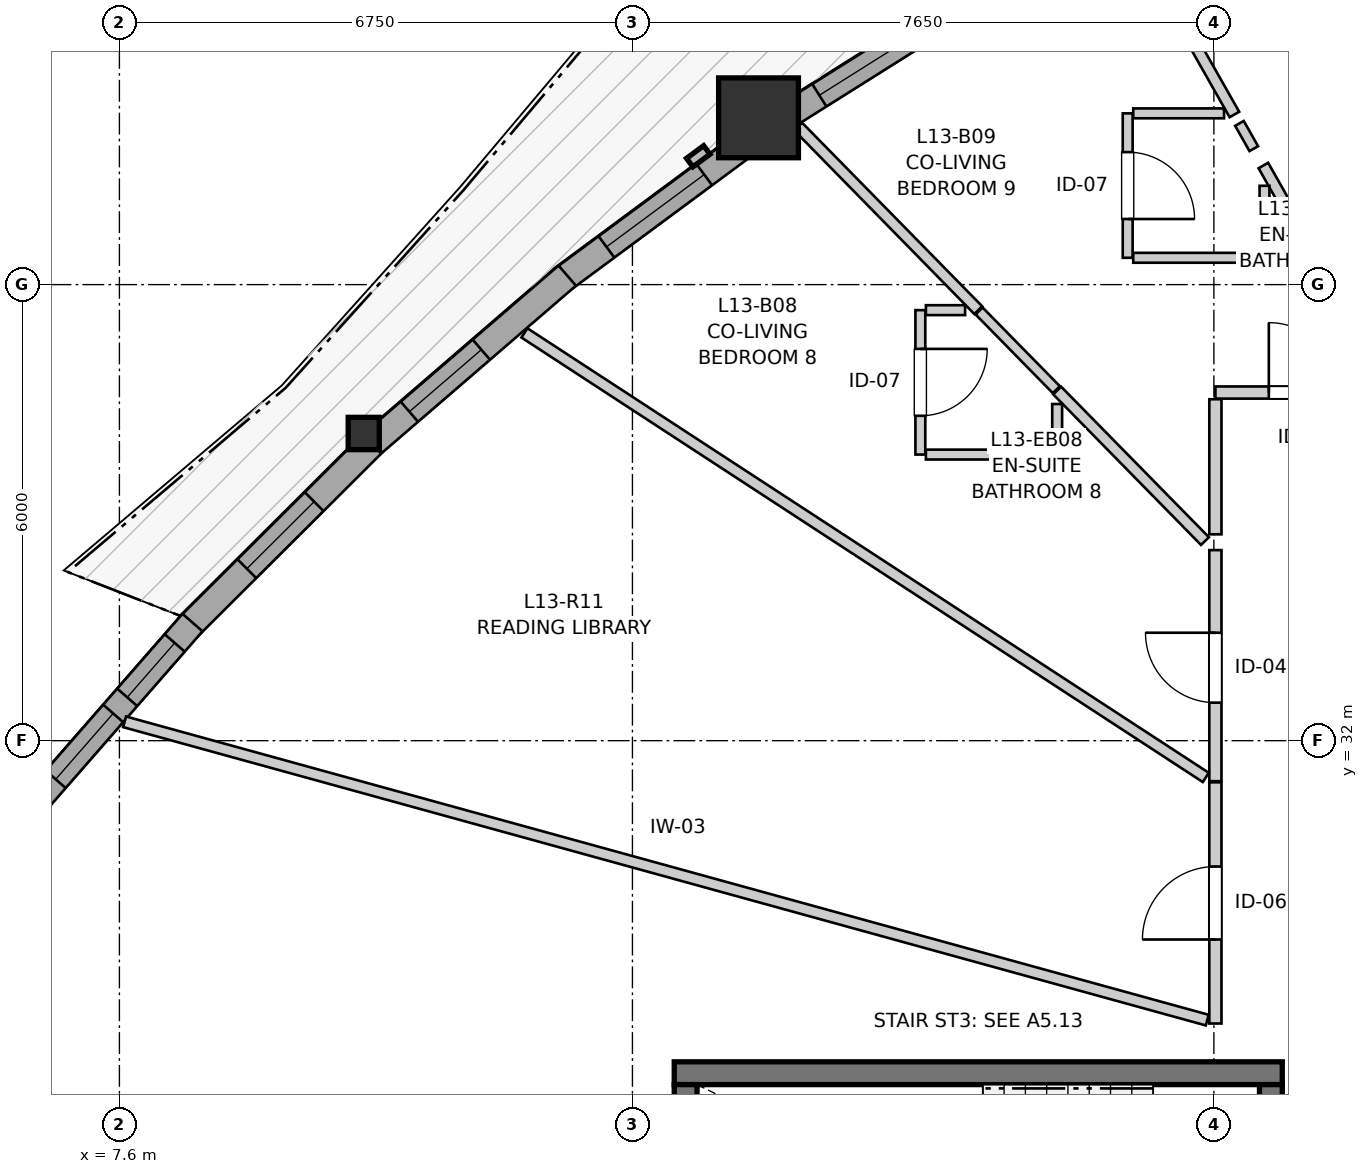
"""IFC4 building model, lengths in metres.
Left out: names, types, materials, properties, quantities, classifications, styles, units other than length and angle.
Written with IfcOpenShell. Run it as: python <this file> out.ifc"""

import sys

from ifc_helpers import new_model, si_unit, direction, frame, frame_2d, origin, origin_2d, place, context, subcontext, project, spatial, rectangle, i_section, extrude, source, transform, mapped, element, fill, save


model = new_model("IFC4")
c1 = context("Model", 3, precision=1e-05, world=origin(), true_north=direction((0.0, 1.0)))
c2 = subcontext(c1, "Body", "Model", "MODEL_VIEW")
j1 = project(units=[si_unit("LENGTHUNIT", "METRE"), si_unit("PLANEANGLEUNIT", "RADIAN")], contexts=[c1])
p1 = place(None, origin())
s1 = spatial("IfcSite", under=j1, at=p1, CompositionType="ELEMENT")
p2 = place(p1, origin())
s2 = spatial("IfcBuilding", under=s1, at=p2, CompositionType="ELEMENT")
p3 = place(p2, frame((0.0, 0.0, 46.2)))
s3 = spatial("IfcBuildingStorey", under=s2, at=p3, CompositionType="ELEMENT", Elevation=46.2)
p4 = place(p3, frame((22.9, 27.625, 0.0), z_axis=(0.0, 0.0, 1.0), x_axis=(-1.0, 0.0, 0.0)))
e1 = element("IfcWall", 1, at=p4, inside=s3, PredefinedType="SHEAR", context=c2, shape_type="SweptSolid", body=[
    extrude(rectangle(XDim=8.0, YDim=0.3, at=frame_2d((4.0, 0.0))), origin(), (0.0, 0.0, 1.0), 2.94),
])
p5 = place(p3, frame((15.05, 27.475, 0.0), z_axis=(0.0, 0.0, 1.0), x_axis=(0.0, -1.0, 0.0)))
e2 = element("IfcWall", 2, at=p5, inside=s3, PredefinedType="SHEAR", context=c2, shape_type="SweptSolid", body=[
    extrude(rectangle(XDim=2.95, YDim=0.3, at=frame_2d((1.475, 0.0))), origin(), (0.0, 0.0, 1.0), 2.94),
])
p6 = place(p3, frame((22.75, 24.525, 0.0), z_axis=(0.0, 0.0, 1.0), x_axis=(0.0, 1.0, 0.0)))
e3 = element("IfcWall", 3, at=p6, inside=s3, PredefinedType="SHEAR", context=c2, shape_type="SweptSolid", body=[
    extrude(rectangle(XDim=2.95, YDim=0.3, at=frame_2d((1.475, 0.0))), origin(), (0.0, 0.0, 1.0), 2.94),
])
p7 = place(p6, frame((0.985, 0.0, 0.0)))
e4 = element("IfcOpeningElement", 4, at=p7, cuts=e3, PredefinedType="OPENING", context=c2, shape_type="SweptSolid", body=[
    extrude(rectangle(XDim=0.98, YDim=2.15, at=frame_2d((0.49, 1.075))), frame((0.0, 0.16, 0.0), z_axis=(0.0, -1.0, 0.0), x_axis=(1.0, 0.0, 0.0)), (0.0, 0.0, 1.0), 0.32),
])
m1 = source(origin(), c2, "Body", "SweptSolid", [
    extrude(rectangle(XDim=1.05, YDim=1.05, at=origin_2d()), origin(), (0.0, 0.0, 1.0), 2.94),
])
p8 = place(p3, frame((16.009, 40.194, 0.0), z_axis=(0.0, 0.0, 1.0), x_axis=(1.0, 0.0, 0.0)))
e5 = element("IfcColumn", 5, at=p8, inside=s3, PredefinedType="COLUMN", context=c2, shape_type="MappedRepresentation", body=[
    mapped(m1, transform((0.0, 0.0, 0.0), x_axis=(1.0, 0.0, 0.0), y_axis=(0.0, 1.0, 0.0), z_axis=(0.0, 0.0, 1.0), scale=1.0)),
])
m2 = source(origin(), c2, "Body", "SweptSolid", [
    extrude(i_section(OverallWidth=0.409, OverallDepth=0.425, WebThickness=0.03, FlangeThickness=0.048, FilletRadius=0.015, at=origin_2d()), origin(), (0.0, 0.0, 1.0), 2.94),
])
p9 = place(p3, frame((10.815, 36.042, 0.0), z_axis=(0.0, 0.0, 1.0), x_axis=(1.0, 0.0, 0.0)))
e6 = element("IfcColumn", 6, at=p9, inside=s3, PredefinedType="PILASTER", context=c2, shape_type="MappedRepresentation", body=[
    mapped(m2, transform((0.0, 0.0, 0.0), x_axis=(1.0, 0.0, 0.0), y_axis=(0.0, 1.0, 0.0), z_axis=(0.0, 0.0, 1.0), scale=1.0)),
])
p10 = place(p3, frame((18.919, 41.818, 0.0), z_axis=(0.0, 0.0, 1.0), x_axis=(-0.846409172462, -0.532533109555, 0.0)))
e7 = element("IfcWall", 7, at=p10, inside=s3, PredefinedType="SOLIDWALL", context=c2, shape_type="SweptSolid", body=[
    extrude(rectangle(XDim=3.028, YDim=0.35, at=frame_2d((1.514, 0.0))), origin(), (0.0, 0.0, 1.0), 2.42),
])
p11 = place(p10, frame((0.543, 0.0, 0.82)))
e8 = element("IfcOpeningElement", 8, at=p11, cuts=e7, PredefinedType="OPENING", context=c2, shape_type="SweptSolid", body=[
    extrude(rectangle(XDim=1.95, YDim=1.4, at=frame_2d((0.975, 0.7))), frame((0.0, 0.185, 0.0), z_axis=(0.0, -1.0, 0.0), x_axis=(1.0, 0.0, 0.0)), (0.0, 0.0, 1.0), 0.37),
])
p12 = place(p3, frame((15.872, 39.875, 0.0), z_axis=(0.0, 0.0, 1.0), x_axis=(-0.803801282622, -0.594897888763, 0.0)))
e9 = element("IfcWall", 9, at=p12, inside=s3, PredefinedType="SOLIDWALL", context=c2, shape_type="SweptSolid", body=[
    extrude(rectangle(XDim=3.047, YDim=0.35, at=frame_2d((1.523, 0.0))), origin(), (0.0, 0.0, 1.0), 2.42),
])
p13 = place(p12, frame((0.719, 0.0, 0.82)))
e10 = element("IfcOpeningElement", 10, at=p13, cuts=e9, PredefinedType="OPENING", context=c2, shape_type="SweptSolid", body=[
    extrude(rectangle(XDim=1.6, YDim=1.35, at=frame_2d((0.8, 0.675))), frame((0.0, 0.185, 0.0), z_axis=(0.0, -1.0, 0.0), x_axis=(1.0, 0.0, 0.0)), (0.0, 0.0, 1.0), 0.37),
])
p14 = place(p3, frame((13.492, 38.118, 0.0), z_axis=(0.0, 0.0, 1.0), x_axis=(-0.7574607021, -0.652880758465, 0.0)))
e11 = element("IfcWall", 11, at=p14, inside=s3, PredefinedType="SOLIDWALL", context=c2, shape_type="SweptSolid", body=[
    extrude(rectangle(XDim=3.364, YDim=0.35, at=frame_2d((1.682, 0.0))), origin(), (0.0, 0.0, 1.0), 2.42),
])
p15 = place(p14, frame((1.492, 0.0, 0.82)))
e12 = element("IfcOpeningElement", 12, at=p15, cuts=e11, PredefinedType="OPENING", context=c2, shape_type="SweptSolid", body=[
    extrude(rectangle(XDim=1.25, YDim=1.35, at=frame_2d((0.625, 0.675))), frame((0.0, 0.185, 0.0), z_axis=(0.0, -1.0, 0.0), x_axis=(1.0, 0.0, 0.0)), (0.0, 0.0, 1.0), 0.37),
])
p16 = place(p3, frame((10.924, 35.903, 0.0), z_axis=(0.0, 0.0, 1.0), x_axis=(-0.708390611179, -0.705820616016, 0.0)))
e13 = element("IfcWall", 13, at=p16, inside=s3, PredefinedType="SOLIDWALL", context=c2, shape_type="SweptSolid", body=[
    extrude(rectangle(XDim=3.42, YDim=0.35, at=frame_2d((1.71, 0.0))), origin(), (0.0, 0.0, 1.0), 2.42),
])
p17 = place(p16, frame((1.075, 0.0, 0.82)))
e14 = element("IfcOpeningElement", 14, at=p17, cuts=e13, PredefinedType="OPENING", context=c2, shape_type="SweptSolid", body=[
    extrude(rectangle(XDim=1.25, YDim=1.35, at=frame_2d((0.625, 0.675))), frame((0.0, 0.185, 0.0), z_axis=(0.0, -1.0, 0.0), x_axis=(1.0, 0.0, 0.0)), (0.0, 0.0, 1.0), 0.37),
])
p18 = place(p3, frame((8.562, 33.554, 0.0), z_axis=(0.0, 0.0, 1.0), x_axis=(-0.657600137419, -0.753367147722, 0.0)))
e15 = element("IfcWall", 15, at=p18, inside=s3, PredefinedType="SOLIDWALL", context=c2, shape_type="SweptSolid", body=[
    extrude(rectangle(XDim=3.212, YDim=0.35, at=frame_2d((1.606, 0.0))), origin(), (0.0, 0.0, 1.0), 2.42),
])
p19 = place(p18, frame((0.356, 0.0, 0.82)))
e16 = element("IfcOpeningElement", 16, at=p19, cuts=e15, PredefinedType="OPENING", context=c2, shape_type="SweptSolid", body=[
    extrude(rectangle(XDim=0.95, YDim=1.35, at=frame_2d((0.475, 0.675))), frame((0.0, 0.185, 0.0), z_axis=(0.0, -1.0, 0.0), x_axis=(1.0, 0.0, 0.0)), (0.0, 0.0, 1.0), 0.37),
])
p20 = place(p18, frame((1.587, 0.0, 0.82)))
e17 = element("IfcOpeningElement", 17, at=p20, cuts=e15, PredefinedType="OPENING", context=c2, shape_type="SweptSolid", body=[
    extrude(rectangle(XDim=1.15, YDim=1.2, at=frame_2d((0.575, 0.6))), frame((0.0, 0.185, 0.0), z_axis=(0.0, -1.0, 0.0), x_axis=(1.0, 0.0, 0.0)), (0.0, 0.0, 1.0), 0.37),
])
p21 = place(p3, frame((22.02, 28.279, 0.0), z_axis=(0.0, 0.0, 1.0), x_axis=(0.0, 1.0, 0.0)))
e18 = element("IfcWall", 18, at=p21, inside=s3, PredefinedType="PARTITIONING", context=c2, shape_type="SweptSolid", body=[
    extrude(rectangle(XDim=3.173, YDim=0.16, at=frame_2d((1.586, 0.0))), origin(), (0.0, 0.0, 1.0), 2.94),
])
p22 = place(p21, frame((1.105, 0.0, 0.0)))
e19 = element("IfcOpeningElement", 19, at=p22, cuts=e18, PredefinedType="OPENING", context=c2, shape_type="SweptSolid", body=[
    extrude(rectangle(XDim=0.96, YDim=2.1, at=frame_2d((0.48, 1.05))), frame((0.0, 0.09, 0.0), z_axis=(0.0, -1.0, 0.0), x_axis=(1.0, 0.0, 0.0)), (0.0, 0.0, 1.0), 0.18),
])
p23 = place(p3, frame((22.02, 31.467, 0.0), z_axis=(0.0, 0.0, 1.0), x_axis=(0.0, 1.0, 0.0)))
e20 = element("IfcWall", 20, at=p23, inside=s3, PredefinedType="PARTITIONING", context=c2, shape_type="SweptSolid", body=[
    extrude(rectangle(XDim=3.04, YDim=0.16, at=frame_2d((1.52, 0.0))), origin(), (0.0, 0.0, 1.0), 2.94),
])
p24 = place(p23, frame((1.033, 0.0, 0.0)))
e21 = element("IfcOpeningElement", 21, at=p24, cuts=e20, PredefinedType="OPENING", context=c2, shape_type="SweptSolid", body=[
    extrude(rectangle(XDim=0.92, YDim=2.1, at=frame_2d((0.46, 1.05))), frame((0.0, 0.09, 0.0), z_axis=(0.0, -1.0, 0.0), x_axis=(1.0, 0.0, 0.0)), (0.0, 0.0, 1.0), 0.18),
])
p25 = place(p3, frame((22.02, 36.58, 0.0), z_axis=(0.0, 0.0, 1.0), x_axis=(1.0, 0.0, 0.0)))
e22 = element("IfcWall", 22, at=p25, inside=s3, PredefinedType="PARTITIONING", context=c2, shape_type="SweptSolid", body=[
    extrude(rectangle(XDim=2.294, YDim=0.16, at=frame_2d((1.147, 0.0))), origin(), (0.0, 0.0, 1.0), 2.548),
])
p26 = place(p25, frame((0.703, 0.0, 0.0)))
e23 = element("IfcOpeningElement", 23, at=p26, cuts=e22, PredefinedType="OPENING", context=c2, shape_type="SweptSolid", body=[
    extrude(rectangle(XDim=0.92, YDim=2.1, at=frame_2d((0.46, 1.05))), frame((0.0, 0.09, 0.0), z_axis=(0.0, -1.0, 0.0), x_axis=(1.0, 0.0, 0.0)), (0.0, 0.0, 1.0), 0.18),
])
p27 = place(p3, frame((18.138, 37.664, 0.0), z_axis=(0.0, 0.0, 1.0), x_axis=(0.0, -1.0, 0.0)))
e24 = element("IfcWall", 24, at=p27, inside=s3, PredefinedType="PARTITIONING", context=c2, shape_type="SweptSolid", body=[
    extrude(rectangle(XDim=1.9, YDim=0.13, at=frame_2d((0.95, 0.0))), origin(), (0.0, 0.0, 1.0), 2.94),
])
p28 = place(p27, frame((0.51, 0.0, 0.0)))
e25 = element("IfcOpeningElement", 25, at=p28, cuts=e24, PredefinedType="OPENING", context=c2, shape_type="SweptSolid", body=[
    extrude(rectangle(XDim=0.88, YDim=2.05, at=frame_2d((0.44, 1.025))), frame((0.0, 0.075, 0.0), z_axis=(0.0, -1.0, 0.0), x_axis=(1.0, 0.0, 0.0)), (0.0, 0.0, 1.0), 0.15),
])
p29 = place(p3, frame((20.866, 40.253, 0.0), z_axis=(0.0, 0.0, 1.0), x_axis=(0.0, -1.0, 0.0)))
e26 = element("IfcWall", 26, at=p29, inside=s3, PredefinedType="PARTITIONING", context=c2, shape_type="SweptSolid", body=[
    extrude(rectangle(XDim=1.9, YDim=0.13, at=frame_2d((0.95, 0.0))), origin(), (0.0, 0.0, 1.0), 2.94),
])
p30 = place(p29, frame((0.51, 0.0, 0.0)))
e27 = element("IfcOpeningElement", 27, at=p30, cuts=e26, PredefinedType="OPENING", context=c2, shape_type="SweptSolid", body=[
    extrude(rectangle(XDim=0.88, YDim=2.05, at=frame_2d((0.44, 1.025))), frame((0.0, 0.075, 0.0), z_axis=(0.0, -1.0, 0.0), x_axis=(1.0, 0.0, 0.0)), (0.0, 0.0, 1.0), 0.15),
])
p31 = place(p3, frame((7.668, 32.248, 0.0), z_axis=(0.0, 0.0, 1.0), x_axis=(0.964084579717, -0.265595412521, 0.0)))
e28 = element("IfcWall", 28, at=p31, inside=s3, PredefinedType="PARTITIONING", context=c2, shape_type="SweptSolid", body=[
    extrude(rectangle(XDim=14.776, YDim=0.145, at=frame_2d((7.388, 0.0))), origin(), (0.0, 0.0, 1.0), 2.94),
])
p32 = place(p3, frame((12.929, 37.365, 0.0), z_axis=(0.0, 0.0, 1.0), x_axis=(0.83754252852, -0.54637213776, 0.0)))
e29 = element("IfcWall", 29, at=p32, inside=s3, PredefinedType="PARTITIONING", context=c2, shape_type="SweptSolid", body=[
    extrude(rectangle(XDim=10.704, YDim=0.145, at=frame_2d((5.352, 0.0))), origin(), (0.0, 0.0, 1.0), 2.94),
])
p33 = place(p3, frame((22.651, 39.567, 0.0), z_axis=(0.0, 0.0, 1.0), x_axis=(0.493566118786, -0.8697082766, 0.0)))
e30 = element("IfcWall", 30, at=p33, inside=s3, PredefinedType="PARTITIONING", context=c2, shape_type="SweptSolid", body=[
    extrude(rectangle(XDim=3.293, YDim=0.145, at=frame_2d((1.647, 0.0))), origin(), (0.0, 0.0, 1.0), 2.94),
])
p34 = place(p3, frame((16.529, 40.081, 0.0), z_axis=(0.0, 0.0, 1.0), x_axis=(0.700331657038, -0.713817602859, 0.0)))
e31 = element("IfcWall", 31, at=p34, inside=s3, PredefinedType="PARTITIONING", context=c2, shape_type="SweptSolid", body=[
    extrude(rectangle(XDim=3.385, YDim=0.145, at=frame_2d((1.693, 0.0))), origin(), (0.0, 0.0, 1.0), 2.308),
])
p35 = place(p3, frame((19.938, 36.607, 0.0), z_axis=(0.0, 0.0, 1.0), x_axis=(0.700568911338, -0.713584753527, 0.0)))
e32 = element("IfcWall", 32, at=p35, inside=s3, PredefinedType="PARTITIONING", context=c2, shape_type="SweptSolid", body=[
    extrude(rectangle(XDim=2.776, YDim=0.145, at=frame_2d((1.388, 0.0))), origin(), (0.0, 0.0, 1.0), 2.308),
])
p36 = place(p3, frame((20.901, 42.651, 0.0), z_axis=(0.0, 0.0, 1.0), x_axis=(0.4934166236, -0.86979309928, 0.0)))
e33 = element("IfcWall", 33, at=p36, inside=s3, PredefinedType="PARTITIONING", context=c2, shape_type="SweptSolid", body=[
    extrude(rectangle(XDim=2.774, YDim=0.145, at=frame_2d((1.387, 0.0))), origin(), (0.0, 0.0, 1.0), 2.94),
])
p37 = place(p3, frame((22.02, 34.715, 0.0), z_axis=(0.0, 0.0, 1.0), x_axis=(0.0, 1.0, 0.0)))
e34 = element("IfcWall", 34, at=p37, inside=s3, PredefinedType="PARTITIONING", context=c2, shape_type="SweptSolid", body=[
    extrude(rectangle(XDim=1.777, YDim=0.16, at=frame_2d((0.888, 0.0))), origin(), (0.0, 0.0, 1.0), 2.94),
])
for number, where, z_axis, x_axis in (
    (35, (20.939, 38.353, 0.0), (0.0, 0.0, 1.0), (1.0, 0.0, 0.0)),
    (36, (18.211, 35.764, 0.0), (0.0, 0.0, 1.0), (1.0, 0.0, 0.0)),
):
    element("IfcWall", number, at=place(p3, frame(where, z_axis=z_axis, x_axis=x_axis)), inside=s3, PredefinedType="PARTITIONING", context=c2, shape_type="SweptSolid", body=[
        extrude(rectangle(XDim=1.727, YDim=0.13, at=frame_2d((0.864, 0.0))), origin(), (0.0, 0.0, 1.0), 2.94),
    ])
p38 = place(p3, frame((18.91, 37.653, 0.0), z_axis=(0.0, 0.0, 1.0), x_axis=(0.700686611827, -0.713469180838, 0.0)))
e37 = element("IfcWall", 37, at=p38, inside=s3, PredefinedType="PARTITIONING", context=c2, shape_type="SweptSolid", body=[
    extrude(rectangle(XDim=1.452, YDim=0.13, at=frame_2d((0.726, 0.0))), origin(), (0.0, 0.0, 1.0), 2.308),
])
p39 = place(p3, frame((20.939, 40.253, 0.0), z_axis=(0.0, 0.0, 1.0), x_axis=(1.0, 0.0, 0.0)))
e38 = element("IfcWall", 38, at=p39, inside=s3, PredefinedType="PARTITIONING", context=c2, shape_type="SweptSolid", body=[
    extrude(rectangle(XDim=1.195, YDim=0.13, at=frame_2d((0.597, 0.0))), origin(), (0.0, 0.0, 1.0), 2.94),
])
p40 = place(p3, frame((22.666, 38.426, 0.0), z_axis=(0.0, 0.0, 1.0), x_axis=(0.0, 1.0, 0.0)))
e39 = element("IfcWall", 39, at=p40, inside=s3, PredefinedType="PARTITIONING", context=c2, shape_type="SweptSolid", body=[
    extrude(rectangle(XDim=0.874, YDim=0.13, at=frame_2d((0.437, 0.0))), origin(), (0.0, 0.0, 1.0), 2.94),
])
p41 = place(p3, frame((19.938, 35.837, 0.0), z_axis=(0.0, 0.0, 1.0), x_axis=(0.0, 1.0, 0.0)))
e40 = element("IfcWall", 40, at=p41, inside=s3, PredefinedType="PARTITIONING", context=c2, shape_type="SweptSolid", body=[
    extrude(rectangle(XDim=0.592, YDim=0.13, at=frame_2d((0.296, 0.0))), origin(), (0.0, 0.0, 1.0), 2.94),
])
p42 = place(p3, frame((18.211, 37.664, 0.0), z_axis=(0.0, 0.0, 1.0), x_axis=(1.0, 0.0, 0.0)))
e41 = element("IfcWall", 41, at=p42, inside=s3, PredefinedType="PARTITIONING", context=c2, shape_type="SweptSolid", body=[
    extrude(rectangle(XDim=0.516, YDim=0.13, at=frame_2d((0.258, 0.0))), origin(), (0.0, 0.0, 1.0), 2.508),
])
p43 = place(p3, frame((22.336, 40.121, 0.0), z_axis=(0.0, 0.0, 1.0), x_axis=(0.493383408092, -0.86981194095, 0.0)))
e42 = element("IfcWall", 42, at=p43, inside=s3, PredefinedType="PARTITIONING", context=c2, shape_type="SweptSolid", body=[
    extrude(rectangle(XDim=0.382, YDim=0.13, at=frame_2d((0.191, 0.0))), origin(), (0.0, 0.0, 1.0), 2.94),
])
m3 = source(origin(), c2, "Body", "SweptSolid", [
    extrude(rectangle(XDim=1.95, YDim=1.4, at=frame_2d((0.975, 0.7))), frame((0.0, 0.03, 0.0), z_axis=(0.0, -1.0, 0.0), x_axis=(1.0, 0.0, 0.0)), (0.0, 0.0, 1.0), 0.06),
])
p44 = place(p11, origin())
e43 = element("IfcWindow", 43, at=p44, inside=s3, PartitioningType="SINGLE_PANEL", PredefinedType="WINDOW", context=c2, shape_type="MappedRepresentation", body=[
    mapped(m3, transform((0.0, 0.0, 0.0), x_axis=(1.0, 0.0, 0.0), y_axis=(0.0, 1.0, 0.0), z_axis=(0.0, 0.0, 1.0), scale=1.0)),
])
fill(e8, e43)
m4 = source(origin(), c2, "Body", "SweptSolid", [
    extrude(rectangle(XDim=1.6, YDim=1.35, at=frame_2d((0.8, 0.675))), frame((0.0, 0.03, 0.0), z_axis=(0.0, -1.0, 0.0), x_axis=(1.0, 0.0, 0.0)), (0.0, 0.0, 1.0), 0.06),
])
p45 = place(p13, origin())
e44 = element("IfcWindow", 44, at=p45, inside=s3, PartitioningType="SINGLE_PANEL", PredefinedType="WINDOW", context=c2, shape_type="MappedRepresentation", body=[
    mapped(m4, transform((0.0, 0.0, 0.0), x_axis=(1.0, 0.0, 0.0), y_axis=(0.0, 1.0, 0.0), z_axis=(0.0, 0.0, 1.0), scale=1.0)),
])
fill(e10, e44)
m5 = source(origin(), c2, "Body", "SweptSolid", [
    extrude(rectangle(XDim=1.25, YDim=1.35, at=frame_2d((0.625, 0.675))), frame((0.0, 0.03, 0.0), z_axis=(0.0, -1.0, 0.0), x_axis=(1.0, 0.0, 0.0)), (0.0, 0.0, 1.0), 0.06),
])
p46 = place(p15, origin())
e45 = element("IfcWindow", 45, at=p46, inside=s3, PartitioningType="SINGLE_PANEL", PredefinedType="WINDOW", context=c2, shape_type="MappedRepresentation", body=[
    mapped(m5, transform((0.0, 0.0, 0.0), x_axis=(1.0, 0.0, 0.0), y_axis=(0.0, 1.0, 0.0), z_axis=(0.0, 0.0, 1.0), scale=1.0)),
])
fill(e12, e45)
p47 = place(p17, origin())
e46 = element("IfcWindow", 46, at=p47, inside=s3, PartitioningType="SINGLE_PANEL", PredefinedType="WINDOW", context=c2, shape_type="MappedRepresentation", body=[
    mapped(m5, transform((0.0, 0.0, 0.0), x_axis=(1.0, 0.0, 0.0), y_axis=(0.0, 1.0, 0.0), z_axis=(0.0, 0.0, 1.0), scale=1.0)),
])
fill(e14, e46)
m6 = source(origin(), c2, "Body", "SweptSolid", [
    extrude(rectangle(XDim=0.95, YDim=1.35, at=frame_2d((0.475, 0.675))), frame((0.0, 0.03, 0.0), z_axis=(0.0, -1.0, 0.0), x_axis=(1.0, 0.0, 0.0)), (0.0, 0.0, 1.0), 0.06),
])
p48 = place(p19, origin())
e47 = element("IfcWindow", 47, at=p48, inside=s3, PartitioningType="SINGLE_PANEL", PredefinedType="WINDOW", context=c2, shape_type="MappedRepresentation", body=[
    mapped(m6, transform((0.0, 0.0, 0.0), x_axis=(1.0, 0.0, 0.0), y_axis=(0.0, 1.0, 0.0), z_axis=(0.0, 0.0, 1.0), scale=1.0)),
])
fill(e16, e47)
m7 = source(origin(), c2, "Body", "SweptSolid", [
    extrude(rectangle(XDim=1.15, YDim=1.2, at=frame_2d((0.575, 0.6))), frame((0.0, 0.03, 0.0), z_axis=(0.0, -1.0, 0.0), x_axis=(1.0, 0.0, 0.0)), (0.0, 0.0, 1.0), 0.06),
])
p49 = place(p20, origin())
e48 = element("IfcWindow", 48, at=p49, inside=s3, PartitioningType="SINGLE_PANEL", PredefinedType="WINDOW", context=c2, shape_type="MappedRepresentation", body=[
    mapped(m7, transform((0.0, 0.0, 0.0), x_axis=(1.0, 0.0, 0.0), y_axis=(0.0, 1.0, 0.0), z_axis=(0.0, 0.0, 1.0), scale=1.0)),
])
fill(e17, e48)
m8 = source(origin(), c2, "Body", "SweptSolid", [
    extrude(rectangle(XDim=0.96, YDim=2.1, at=frame_2d((0.48, 1.05))), frame((0.0, 0.025, 0.0), z_axis=(0.0, -1.0, 0.0), x_axis=(1.0, 0.0, 0.0)), (0.0, 0.0, 1.0), 0.05),
])
p50 = place(p22, origin())
e49 = element("IfcDoor", 49, at=p50, inside=s3, OperationType="SINGLE_SWING_LEFT", PredefinedType="DOOR", context=c2, shape_type="MappedRepresentation", body=[
    mapped(m8, transform((0.0, 0.0, 0.0), x_axis=(1.0, 0.0, 0.0), y_axis=(0.0, 1.0, 0.0), z_axis=(0.0, 0.0, 1.0), scale=1.0)),
])
fill(e19, e49)
m9 = source(origin(), c2, "Body", "SweptSolid", [
    extrude(rectangle(XDim=0.92, YDim=2.1, at=frame_2d((0.46, 1.05))), frame((0.0, 0.025, 0.0), z_axis=(0.0, -1.0, 0.0), x_axis=(1.0, 0.0, 0.0)), (0.0, 0.0, 1.0), 0.05),
])
p51 = place(p24, origin())
e50 = element("IfcDoor", 50, at=p51, inside=s3, OperationType="SINGLE_SWING_RIGHT", PredefinedType="DOOR", context=c2, shape_type="MappedRepresentation", body=[
    mapped(m9, transform((0.0, 0.0, 0.0), x_axis=(1.0, 0.0, 0.0), y_axis=(0.0, 1.0, 0.0), z_axis=(0.0, 0.0, 1.0), scale=1.0)),
])
fill(e21, e50)
p52 = place(p26, origin())
e51 = element("IfcDoor", 51, at=p52, inside=s3, OperationType="SINGLE_SWING_LEFT", PredefinedType="DOOR", context=c2, shape_type="MappedRepresentation", body=[
    mapped(m9, transform((0.0, 0.0, 0.0), x_axis=(1.0, 0.0, 0.0), y_axis=(0.0, 1.0, 0.0), z_axis=(0.0, 0.0, 1.0), scale=1.0)),
])
fill(e23, e51)
m10 = source(origin(), c2, "Body", "SweptSolid", [
    extrude(rectangle(XDim=0.88, YDim=2.05, at=frame_2d((0.44, 1.025))), frame((0.0, 0.025, 0.0), z_axis=(0.0, -1.0, 0.0), x_axis=(1.0, 0.0, 0.0)), (0.0, 0.0, 1.0), 0.05),
])
p53 = place(p28, origin())
e52 = element("IfcDoor", 52, at=p53, inside=s3, OperationType="SINGLE_SWING_LEFT", PredefinedType="DOOR", context=c2, shape_type="MappedRepresentation", body=[
    mapped(m10, transform((0.0, 0.0, 0.0), x_axis=(1.0, 0.0, 0.0), y_axis=(0.0, 1.0, 0.0), z_axis=(0.0, 0.0, 1.0), scale=1.0)),
])
fill(e25, e52)
p54 = place(p30, origin())
e53 = element("IfcDoor", 53, at=p54, inside=s3, OperationType="SINGLE_SWING_RIGHT", PredefinedType="DOOR", context=c2, shape_type="MappedRepresentation", body=[
    mapped(m10, transform((0.0, 0.0, 0.0), x_axis=(1.0, 0.0, 0.0), y_axis=(0.0, 1.0, 0.0), z_axis=(0.0, 0.0, 1.0), scale=1.0)),
])
fill(e27, e53)
save(model, sys.argv[1])
